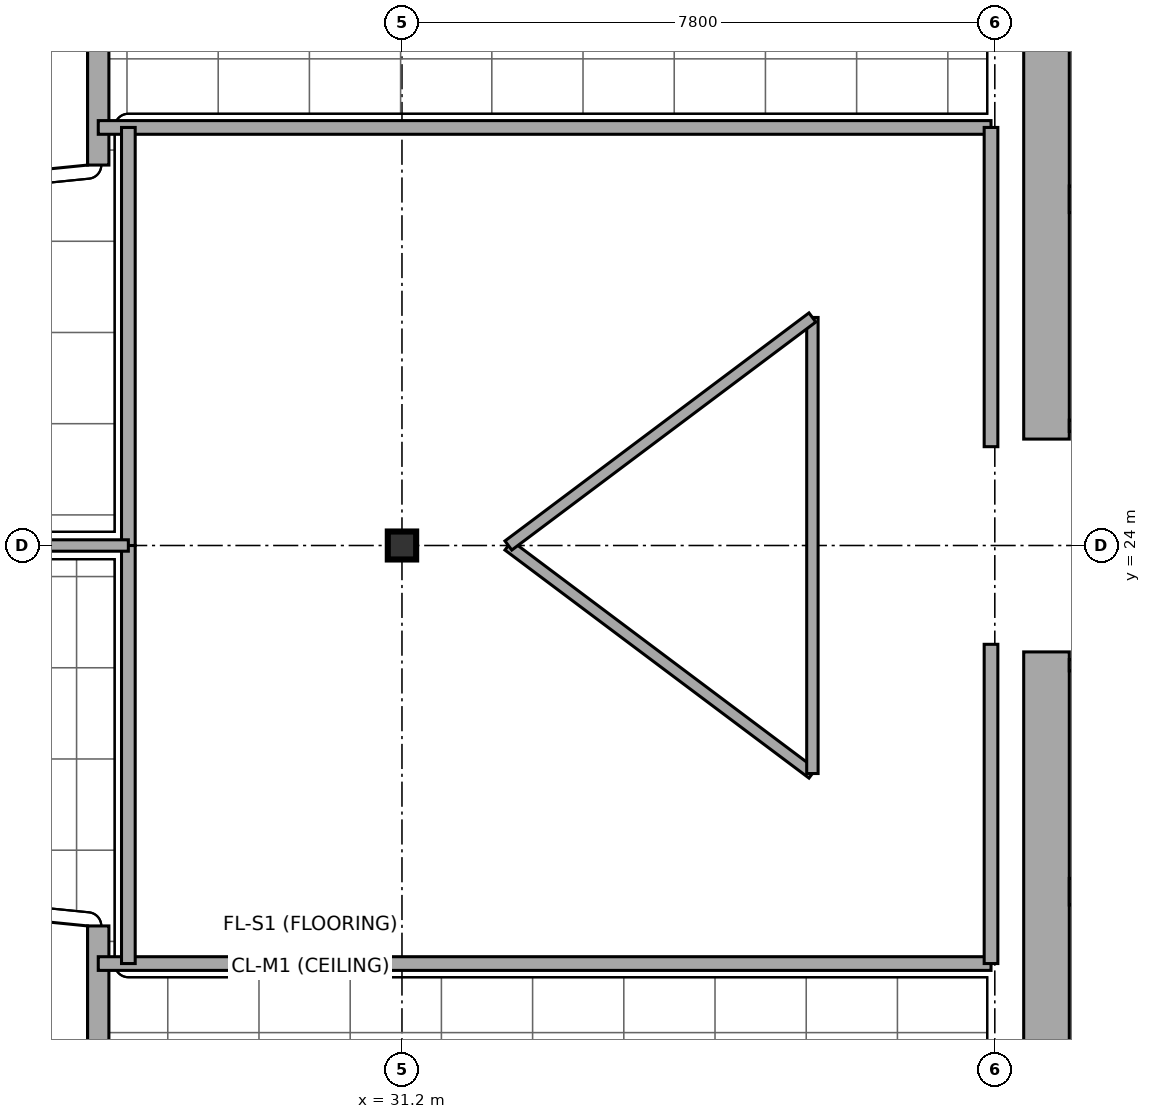
"""IFC4 building model, lengths in metres.
Left out: names, types, materials, properties, quantities, classifications, styles, units other than length and angle.
Written with IfcOpenShell. Run it as: python <this file> out.ifc"""

import sys

from ifc_helpers import new_model, si_unit, direction, frame, frame_2d, origin, origin_2d, place, context, subcontext, project, spatial, rectangle, i_section, extrude, element, fill, save


model = new_model("IFC4")
c1 = context("Model", 3, precision=1e-05, world=origin(), true_north=direction((0.0, 1.0)))
c2 = subcontext(c1, "Body", "Model", "MODEL_VIEW")
j1 = project(units=[si_unit("LENGTHUNIT", "METRE"), si_unit("PLANEANGLEUNIT", "RADIAN")], contexts=[c1])
p1 = place(None, origin())
s1 = spatial("IfcSite", under=j1, at=p1, CompositionType="ELEMENT")
p2 = place(p1, origin())
s2 = spatial("IfcBuilding", under=s1, at=p2, CompositionType="ELEMENT")
p3 = place(p2, frame((0.0, 0.0, 262.05)))
s3 = spatial("IfcBuildingStorey", under=s2, at=p3, CompositionType="ELEMENT", Elevation=262.05)
for number, where, z_axis, x_axis in (
    (1, (39.68, 16.45, 0.0), (0.0, 0.0, 1.0), (0.0, 1.0, 0.0)),
    (2, (39.68, 25.4, 0.0), (0.0, 0.0, 1.0), (0.0, 1.0, 0.0)),
):
    element("IfcWall", number, at=place(p3, frame(where, z_axis=z_axis, x_axis=x_axis)), inside=s3, PredefinedType="SHEAR", context=c2, shape_type="SweptSolid", body=[
        extrude(rectangle(XDim=6.15, YDim=0.6, at=frame_2d((3.075, 0.0))), origin(), (0.0, 0.0, 1.0), 4.56),
    ])
p4 = place(p3, frame((39.98, 28.555, 0.0), z_axis=(0.0, 0.0, 1.0), x_axis=(1.0, 0.0, 0.0)))
e3 = element("IfcWall", 3, at=p4, inside=s3, PredefinedType="SHEAR", context=c2, shape_type="SweptSolid", body=[
    extrude(rectangle(XDim=7.71, YDim=0.35, at=frame_2d((3.855, 0.0))), origin(), (0.0, 0.0, 1.0), 4.56),
])
p5 = place(p4, frame((0.25, 0.0, 0.0)))
e4 = element("IfcOpeningElement", 4, at=p5, cuts=e3, PredefinedType="OPENING", context=c2, shape_type="SweptSolid", body=[
    extrude(rectangle(XDim=1.1, YDim=2.15, at=frame_2d((0.55, 1.075))), frame((0.0, 0.185, 0.0), z_axis=(0.0, -1.0, 0.0), x_axis=(1.0, 0.0, 0.0)), (0.0, 0.0, 1.0), 0.37),
])
p6 = place(p3, frame((39.98, 19.445, 0.0), z_axis=(0.0, 0.0, 1.0), x_axis=(1.0, 0.0, 0.0)))
e5 = element("IfcWall", 5, at=p6, inside=s3, PredefinedType="SHEAR", context=c2, shape_type="SweptSolid", body=[
    extrude(rectangle(XDim=7.71, YDim=0.35, at=frame_2d((3.855, 0.0))), origin(), (0.0, 0.0, 1.0), 4.56),
])
p7 = place(p6, frame((0.25, 0.0, 0.0)))
e6 = element("IfcOpeningElement", 6, at=p7, cuts=e5, PredefinedType="OPENING", context=c2, shape_type="SweptSolid", body=[
    extrude(rectangle(XDim=1.1, YDim=2.15, at=frame_2d((0.55, 1.075))), frame((0.0, 0.185, 0.0), z_axis=(0.0, -1.0, 0.0), x_axis=(1.0, 0.0, 0.0)), (0.0, 0.0, 1.0), 0.37),
])
p8 = place(p3, frame((31.2, 24.0, 0.0), z_axis=(0.0, 0.0, 1.0), x_axis=(1.0, 0.0, 0.0)))
e7 = element("IfcColumn", 7, at=p8, inside=s3, PredefinedType="COLUMN", context=c2, shape_type="SweptSolid", body=[
    extrude(i_section(OverallWidth=0.373, OverallDepth=0.368, WebThickness=0.015, FlangeThickness=0.024, at=origin_2d()), origin(), (0.0, 0.0, 1.0), 4.794),
])
for number, where, z_axis, x_axis in (
    (8, (27.204, 32.0, 0.0), (0.0, 0.0, 1.0), (0.0, -1.0, 0.0)),
    (9, (27.204, 18.995, 0.0), (0.0, 0.0, 1.0), (0.0, -1.0, 0.0)),
):
    element("IfcWall", number, at=place(p3, frame(where, z_axis=z_axis, x_axis=x_axis)), inside=s3, PredefinedType="STANDARD", context=c2, shape_type="SweptSolid", body=[
        extrude(rectangle(XDim=2.995, YDim=0.28, at=frame_2d((1.498, 0.0))), origin(), (0.0, 0.0, 1.0), 4.089),
    ])
p9 = place(p3, frame((39.98, 25.575, 0.0), z_axis=(0.0, 0.0, 1.0), x_axis=(1.0, 0.0, 0.0)))
e10 = element("IfcWall", 10, at=p9, inside=s3, PredefinedType="PARTITIONING", context=c2, shape_type="SweptSolid", body=[
    extrude(rectangle(XDim=5.9, YDim=0.15, at=frame_2d((2.95, 0.0))), origin(), (0.0, 0.0, 1.0), 4.56),
])
p10 = place(p9, frame((2.35, 0.0, 0.0)))
e11 = element("IfcOpeningElement", 11, at=p10, cuts=e10, PredefinedType="OPENING", context=c2, shape_type="SweptSolid", body=[
    extrude(rectangle(XDim=1.05, YDim=2.15, at=frame_2d((0.525, 1.075))), frame((0.0, 0.085, 0.0), z_axis=(0.0, -1.0, 0.0), x_axis=(1.0, 0.0, 0.0)), (0.0, 0.0, 1.0), 0.17),
])
p11 = place(p3, frame((39.98, 22.425, 0.0), z_axis=(0.0, 0.0, 1.0), x_axis=(1.0, 0.0, 0.0)))
e12 = element("IfcWall", 12, at=p11, inside=s3, PredefinedType="PARTITIONING", context=c2, shape_type="SweptSolid", body=[
    extrude(rectangle(XDim=5.9, YDim=0.15, at=frame_2d((2.95, 0.0))), origin(), (0.0, 0.0, 1.0), 4.56),
])
p12 = place(p11, frame((2.35, 0.0, 0.0)))
e13 = element("IfcOpeningElement", 13, at=p12, cuts=e12, PredefinedType="OPENING", context=c2, shape_type="SweptSolid", body=[
    extrude(rectangle(XDim=1.05, YDim=2.15, at=frame_2d((0.525, 1.075))), frame((0.0, 0.085, 0.0), z_axis=(0.0, -1.0, 0.0), x_axis=(1.0, 0.0, 0.0)), (0.0, 0.0, 1.0), 0.17),
])
p13 = place(p3, frame((27.204, 18.5, 0.0), z_axis=(0.0, 0.0, 1.0), x_axis=(1.0, 0.0, 0.0)))
e14 = element("IfcWall", 14, at=p13, inside=s3, PredefinedType="SOLIDWALL", context=c2, shape_type="SweptSolid", body=[
    extrude(rectangle(XDim=11.746, YDim=0.18, at=frame_2d((5.873, 0.0))), origin(), (0.0, 0.0, 1.0), 4.02),
])
p14 = place(p13, frame((5.373, 0.0, 0.0)))
e15 = element("IfcOpeningElement", 15, at=p14, cuts=e14, PredefinedType="OPENING", context=c2, shape_type="SweptSolid", body=[
    extrude(rectangle(XDim=1.0, YDim=2.15, at=frame_2d((0.5, 1.075))), frame((0.0, 0.1, 0.0), z_axis=(0.0, -1.0, 0.0), x_axis=(1.0, 0.0, 0.0)), (0.0, 0.0, 1.0), 0.2),
])
p15 = place(p3, frame((27.204, 29.5, 0.0), z_axis=(0.0, 0.0, 1.0), x_axis=(1.0, 0.0, 0.0)))
e16 = element("IfcWall", 16, at=p15, inside=s3, PredefinedType="SOLIDWALL", context=c2, shape_type="SweptSolid", body=[
    extrude(rectangle(XDim=11.746, YDim=0.18, at=frame_2d((5.873, 0.0))), origin(), (0.0, 0.0, 1.0), 4.02),
])
p16 = place(p15, frame((5.373, 0.0, 0.0)))
e17 = element("IfcOpeningElement", 17, at=p16, cuts=e16, PredefinedType="OPENING", context=c2, shape_type="SweptSolid", body=[
    extrude(rectangle(XDim=1.0, YDim=2.15, at=frame_2d((0.5, 1.075))), frame((0.0, 0.1, 0.0), z_axis=(0.0, -1.0, 0.0), x_axis=(1.0, 0.0, 0.0)), (0.0, 0.0, 1.0), 0.2),
])
p17 = place(p3, frame((27.6, 18.5, 0.0), z_axis=(0.0, 0.0, 1.0), x_axis=(0.0, 1.0, 0.0)))
e18 = element("IfcWall", 18, at=p17, inside=s3, PredefinedType="SOLIDWALL", context=c2, shape_type="SweptSolid", body=[
    extrude(rectangle(XDim=5.5, YDim=0.18, at=frame_2d((2.75, 0.0))), origin(), (0.0, 0.0, 1.0), 4.02),
])
p18 = place(p3, frame((38.95, 18.5, 0.0), z_axis=(0.0, 0.0, 1.0), x_axis=(0.0, 1.0, 0.0)))
e19 = element("IfcWall", 19, at=p18, inside=s3, PredefinedType="SOLIDWALL", context=c2, shape_type="SweptSolid", body=[
    extrude(rectangle(XDim=4.2, YDim=0.18, at=frame_2d((2.1, 0.0))), origin(), (0.0, 0.0, 1.0), 4.29),
])
p19 = place(p3, frame((27.6, 24.0, 0.0), z_axis=(0.0, 0.0, 1.0), x_axis=(0.0, 1.0, 0.0)))
e20 = element("IfcWall", 20, at=p19, inside=s3, PredefinedType="SOLIDWALL", context=c2, shape_type="SweptSolid", body=[
    extrude(rectangle(XDim=5.5, YDim=0.18, at=frame_2d((2.75, 0.0))), origin(), (0.0, 0.0, 1.0), 4.02),
])
p20 = place(p3, frame((38.95, 25.3, 0.0), z_axis=(0.0, 0.0, 1.0), x_axis=(0.0, 1.0, 0.0)))
e21 = element("IfcWall", 21, at=p20, inside=s3, PredefinedType="SOLIDWALL", context=c2, shape_type="SweptSolid", body=[
    extrude(rectangle(XDim=4.2, YDim=0.18, at=frame_2d((2.1, 0.0))), origin(), (0.0, 0.0, 1.0), 4.29),
])
p21 = place(p3, frame((25.084, 24.0, 0.0), z_axis=(0.0, 0.0, 1.0), x_axis=(1.0, 0.0, 0.0)))
e22 = element("IfcWall", 22, at=p21, inside=s3, PredefinedType="MOVABLE", context=c2, shape_type="SweptSolid", body=[
    extrude(rectangle(XDim=2.516, YDim=0.15, at=frame_2d((1.258, 0.0))), origin(), (0.0, 0.0, 1.0), 4.29),
])
p22 = place(p3, frame((32.6, 24.0, 0.0), z_axis=(0.0, 0.0, 1.0), x_axis=(0.8, -0.6, 0.0)))
e23 = element("IfcWall", 23, at=p22, inside=s3, PredefinedType="MOVABLE", context=c2, shape_type="SweptSolid", body=[
    extrude(rectangle(XDim=5.0, YDim=0.15, at=frame_2d((2.5, 0.0))), origin(), (0.0, 0.0, 1.0), 4.56),
])
p23 = place(p3, frame((36.6, 21.0, 0.0), z_axis=(0.0, 0.0, 1.0), x_axis=(0.0, 1.0, 0.0)))
e24 = element("IfcWall", 24, at=p23, inside=s3, PredefinedType="MOVABLE", context=c2, shape_type="SweptSolid", body=[
    extrude(rectangle(XDim=6.0, YDim=0.15, at=frame_2d((3.0, 0.0))), origin(), (0.0, 0.0, 1.0), 4.56),
])
p24 = place(p3, frame((36.6, 27.0, 0.0), z_axis=(0.0, 0.0, 1.0), x_axis=(-0.8, -0.6, 0.0)))
e25 = element("IfcWall", 25, at=p24, inside=s3, PredefinedType="MOVABLE", context=c2, shape_type="SweptSolid", body=[
    extrude(rectangle(XDim=5.0, YDim=0.15, at=frame_2d((2.5, 0.0))), origin(), (0.0, 0.0, 1.0), 4.56),
])
p25 = place(p14, frame((1.0, 0.0, 0.0), z_axis=(0.0, 0.0, 1.0), x_axis=(-1.0, 0.0, 0.0)))
e26 = element("IfcDoor", 26, at=p25, inside=s3, OperationType="SINGLE_SWING_RIGHT", PredefinedType="DOOR", context=c2, shape_type="SweptSolid", body=[
    extrude(rectangle(XDim=1.0, YDim=2.15, at=frame_2d((0.5, 1.075))), frame((0.0, 0.025, 0.0), z_axis=(0.0, -1.0, 0.0), x_axis=(1.0, 0.0, 0.0)), (0.0, 0.0, 1.0), 0.05),
])
fill(e15, e26)
p26 = place(p16, origin())
e27 = element("IfcDoor", 27, at=p26, inside=s3, OperationType="SINGLE_SWING_LEFT", PredefinedType="DOOR", context=c2, shape_type="SweptSolid", body=[
    extrude(rectangle(XDim=1.0, YDim=2.15, at=frame_2d((0.5, 1.075))), frame((0.0, 0.025, 0.0), z_axis=(0.0, -1.0, 0.0), x_axis=(1.0, 0.0, 0.0)), (0.0, 0.0, 1.0), 0.05),
])
fill(e17, e27)
save(model, sys.argv[1])
